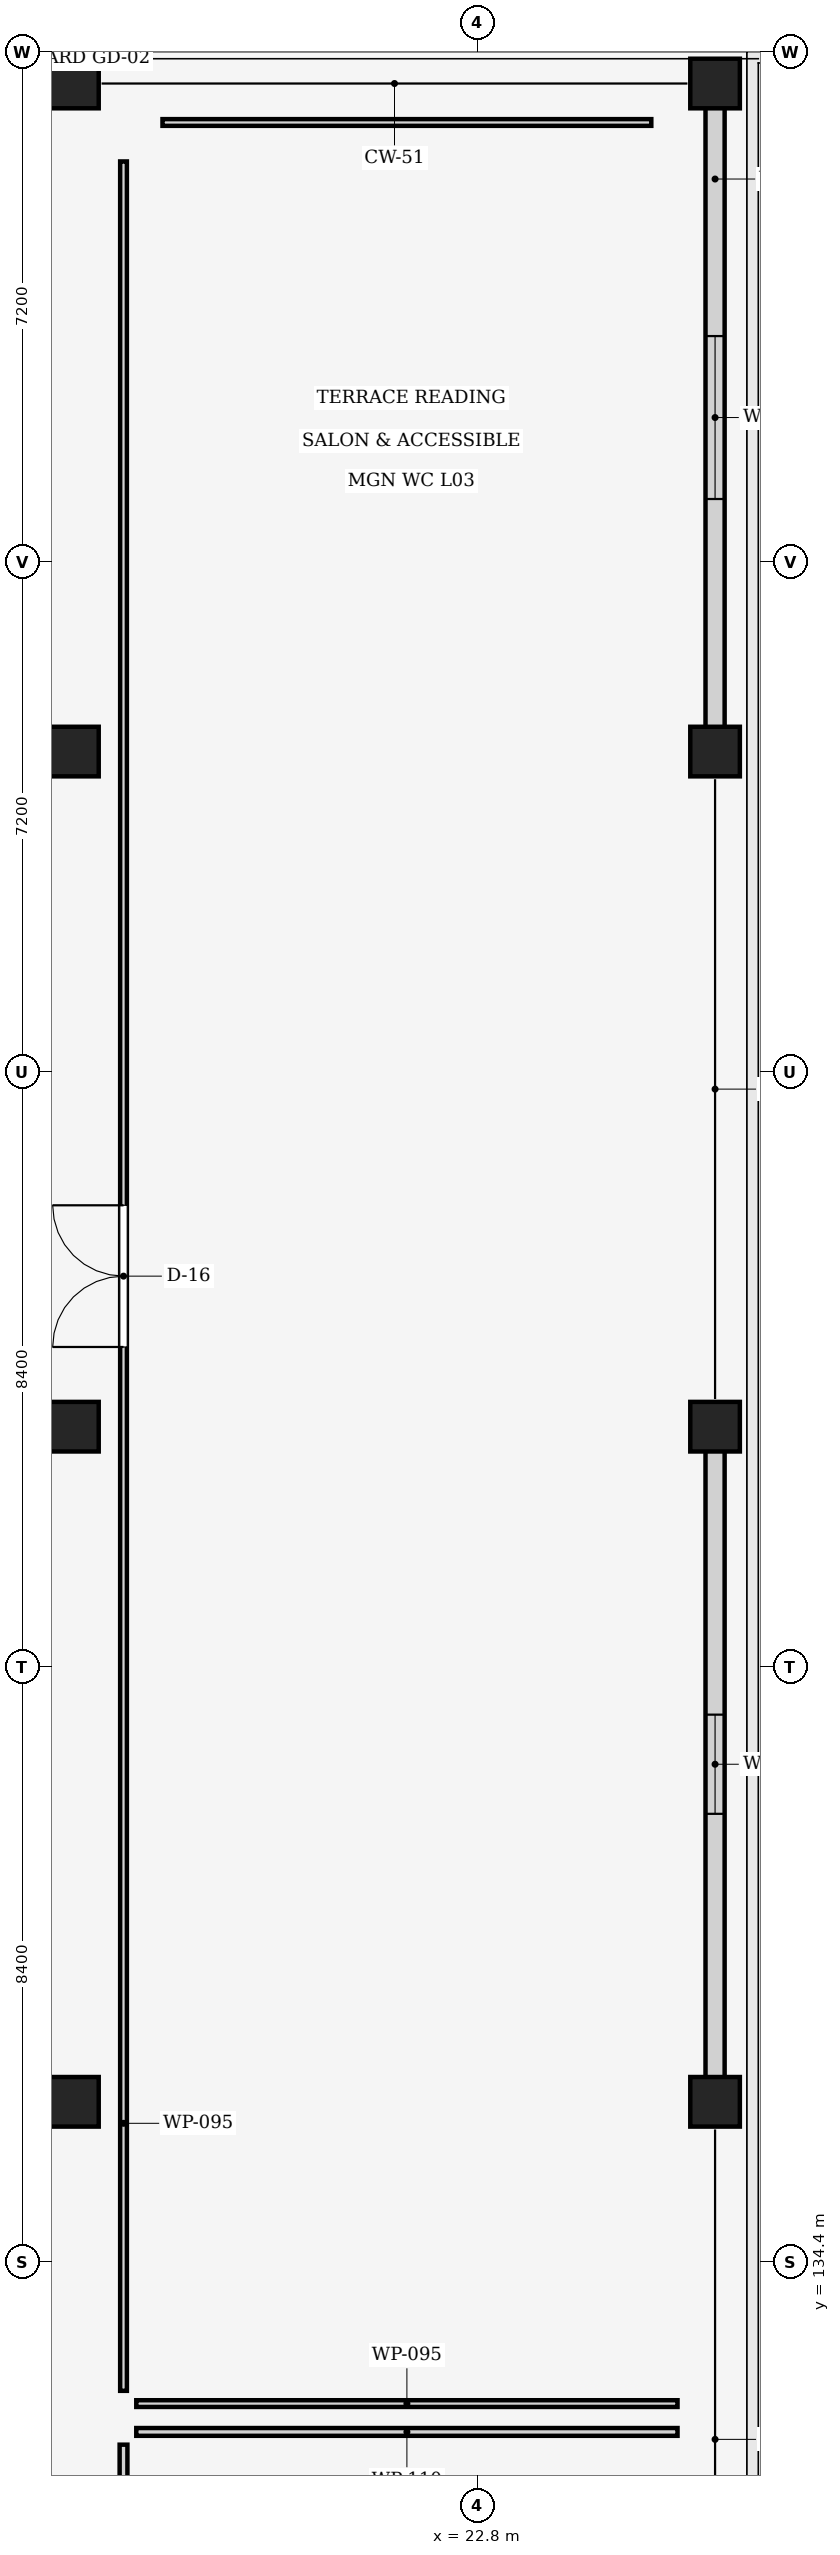
"""IFC4 building model, lengths in metres.
Left out: names, types, materials, properties, quantities, classifications, styles, units other than length and angle.
Written with IfcOpenShell. Run it as: python <this file> out.ifc"""

import sys

from ifc_helpers import new_model, si_unit, direction, frame, frame_2d, origin, origin_2d, place, context, subcontext, project, spatial, rectangle, extrude, element, fill, save


model = new_model("IFC4")
c1 = context("Model", 3, precision=1e-05, world=origin(), true_north=direction((0.0, 1.0)))
c2 = subcontext(c1, "Body", "Model", "MODEL_VIEW")
j1 = project(units=[si_unit("LENGTHUNIT", "METRE"), si_unit("PLANEANGLEUNIT", "RADIAN")], contexts=[c1])
p1 = place(None, origin())
s1 = spatial("IfcSite", under=j1, at=p1, CompositionType="ELEMENT")
p2 = place(p1, origin())
s2 = spatial("IfcBuilding", under=s1, at=p2, CompositionType="ELEMENT")
p3 = place(p2, frame((0.0, 0.0, 13.2)))
s3 = spatial("IfcBuildingStorey", under=s2, at=p3, CompositionType="ELEMENT", Elevation=13.2)
for number, where, z_axis, x_axis in (
    (1, (17.1, 136.66, 0.0), (0.0, 0.0, 1.0), (1.0, 0.0, 0.0)),
    (2, (17.1, 146.19, 0.0), (0.0, 0.0, 1.0), (1.0, 0.0, 0.0)),
    (3, (17.1, 155.72, 0.0), (0.0, 0.0, 1.0), (1.0, 0.0, 0.0)),
    (4, (17.1, 165.15, 0.0), (0.0, 0.0, 1.0), (1.0, 0.0, 0.0)),
    (5, (26.15, 136.66, 0.0), (0.0, 0.0, 1.0), (1.0, 0.0, 0.0)),
    (6, (26.15, 146.19, 0.0), (0.0, 0.0, 1.0), (1.0, 0.0, 0.0)),
    (7, (26.15, 155.72, 0.0), (0.0, 0.0, 1.0), (1.0, 0.0, 0.0)),
    (8, (26.15, 165.15, 0.0), (0.0, 0.0, 1.0), (1.0, 0.0, 0.0)),
):
    element("IfcColumn", number, at=place(p3, frame(where, z_axis=z_axis, x_axis=x_axis)), inside=s3, PredefinedType="COLUMN", context=c2, shape_type="SweptSolid", body=[
        extrude(rectangle(XDim=0.7, YDim=0.7, at=origin_2d()), origin(), (0.0, 0.0, 1.0), 4.05),
    ])
p4 = place(p3, frame((26.15, 164.865, 0.0), z_axis=(0.0, 0.0, 1.0), x_axis=(0.0, -1.0, 0.0)))
e9 = element("IfcWall", 9, at=p4, inside=s3, PredefinedType="STANDARD", context=c2, shape_type="SweptSolid", body=[
    extrude(rectangle(XDim=8.86, YDim=0.27, at=frame_2d((4.43, 0.0))), origin(), (0.0, 0.0, 1.0), 3.165),
])
p5 = place(p4, frame((3.28, 0.0, 0.85)))
e10 = element("IfcOpeningElement", 10, at=p5, cuts=e9, PredefinedType="OPENING", context=c2, shape_type="SweptSolid", body=[
    extrude(rectangle(XDim=2.3, YDim=1.85, at=frame_2d((1.15, 0.925))), frame((0.0, 0.145, 0.0), z_axis=(0.0, -1.0, 0.0), x_axis=(1.0, 0.0, 0.0)), (0.0, 0.0, 1.0), 0.29),
])
p6 = place(p3, frame((26.15, 145.905, 0.0), z_axis=(0.0, 0.0, 1.0), x_axis=(0.0, -1.0, 0.0)))
e11 = element("IfcWall", 11, at=p6, inside=s3, PredefinedType="STANDARD", context=c2, shape_type="SweptSolid", body=[
    extrude(rectangle(XDim=8.96, YDim=0.27, at=frame_2d((4.48, 0.0))), origin(), (0.0, 0.0, 1.0), 3.165),
])
p7 = place(p6, frame((3.78, 0.0, 0.85)))
e12 = element("IfcOpeningElement", 12, at=p7, cuts=e11, PredefinedType="OPENING", context=c2, shape_type="SweptSolid", body=[
    extrude(rectangle(XDim=1.4, YDim=2.05, at=frame_2d((0.7, 1.025))), frame((0.0, 0.145, 0.0), z_axis=(0.0, -1.0, 0.0), x_axis=(1.0, 0.0, 0.0)), (0.0, 0.0, 1.0), 0.29),
])
p8 = place(p3, frame((8.335, 165.15, 0.0), z_axis=(0.0, 0.0, 1.0), x_axis=(1.0, 0.0, 0.0)))
e13 = element("IfcWall", 13, at=p8, inside=s3, PredefinedType="STANDARD", context=c2, shape_type="SweptSolid", body=[
    extrude(rectangle(XDim=8.48, YDim=0.27, at=frame_2d((4.24, 0.0))), origin(), (0.0, 0.0, 1.0), 3.015),
])
p9 = place(p8, frame((2.94, 0.0, 0.85)))
e14 = element("IfcOpeningElement", 14, at=p9, cuts=e13, PredefinedType="OPENING", context=c2, shape_type="SweptSolid", body=[
    extrude(rectangle(XDim=2.6, YDim=1.85, at=frame_2d((1.3, 0.925))), frame((0.0, 0.145, 0.0), z_axis=(0.0, -1.0, 0.0), x_axis=(1.0, 0.0, 0.0)), (0.0, 0.0, 1.0), 0.29),
])
p10 = place(p3, frame((17.8, 102.15, 0.0), z_axis=(0.0, 0.0, 1.0), x_axis=(0.0, 1.0, 0.0)))
e15 = element("IfcWall", 15, at=p10, inside=s3, PredefinedType="PARTITIONING", context=c2, shape_type="SweptSolid", body=[
    extrude(rectangle(XDim=29.67, YDim=0.11, at=frame_2d((14.835, 0.0))), origin(), (0.0, 0.0, 1.0), 3.015),
])
p11 = place(p10, frame((13.085, 0.0, 0.0)))
e16 = element("IfcOpeningElement", 16, at=p11, cuts=e15, PredefinedType="OPENING", context=c2, shape_type="SweptSolid", body=[
    extrude(rectangle(XDim=1.8, YDim=2.22, at=frame_2d((0.9, 1.11))), frame((0.0, 0.065, 0.0), z_axis=(0.0, -1.0, 0.0), x_axis=(1.0, 0.0, 0.0)), (0.0, 0.0, 1.0), 0.13),
])
p12 = place(p3, frame((17.98, 132.0, 0.0), z_axis=(0.0, 0.0, 1.0), x_axis=(1.0, 0.0, 0.0)))
e17 = element("IfcWall", 17, at=p12, inside=s3, PredefinedType="PARTITIONING", context=c2, shape_type="SweptSolid", body=[
    extrude(rectangle(XDim=7.64, YDim=0.11, at=frame_2d((3.82, 0.0))), origin(), (0.0, 0.0, 1.0), 3.7),
])
p13 = place(p3, frame((17.8, 132.58, 0.0), z_axis=(0.0, 0.0, 1.0), x_axis=(0.0, 1.0, 0.0)))
e18 = element("IfcWall", 18, at=p13, inside=s3, PredefinedType="PARTITIONING", context=c2, shape_type="SweptSolid", body=[
    extrude(rectangle(XDim=31.47, YDim=0.095, at=frame_2d((15.735, 0.0))), origin(), (0.0, 0.0, 1.0), 3.015),
])
p14 = place(p13, frame((14.735, 0.0, 0.0)))
e19 = element("IfcOpeningElement", 19, at=p14, cuts=e18, PredefinedType="OPENING", context=c2, shape_type="SweptSolid", body=[
    extrude(rectangle(XDim=2.0, YDim=2.22, at=frame_2d((1.0, 1.11))), frame((0.0, 0.057, 0.0), z_axis=(0.0, -1.0, 0.0), x_axis=(1.0, 0.0, 0.0)), (0.0, 0.0, 1.0), 0.115),
])
p15 = place(p3, frame((25.62, 132.4, 0.0), z_axis=(0.0, 0.0, 1.0), x_axis=(-1.0, 0.0, 0.0)))
e20 = element("IfcWall", 20, at=p15, inside=s3, PredefinedType="PARTITIONING", context=c2, shape_type="SweptSolid", body=[
    extrude(rectangle(XDim=7.64, YDim=0.095, at=frame_2d((3.82, 0.0))), origin(), (0.0, 0.0, 1.0), 3.7),
])
p16 = place(p3, frame((18.35, 164.6, 0.0), z_axis=(0.0, 0.0, 1.0), x_axis=(1.0, 0.0, 0.0)))
e21 = element("IfcWall", 21, at=p16, inside=s3, PredefinedType="PARTITIONING", context=c2, shape_type="SweptSolid", body=[
    extrude(rectangle(XDim=6.9, YDim=0.095, at=frame_2d((3.45, 0.0))), origin(), (0.0, 0.0, 1.0), 3.7),
])
p17 = place(p5, origin())
e22 = element("IfcWindow", 22, at=p17, inside=s3, PartitioningType="SINGLE_PANEL", PredefinedType="WINDOW", context=c2, shape_type="SweptSolid", body=[
    extrude(rectangle(XDim=2.3, YDim=1.85, at=frame_2d((1.15, 0.925))), frame((0.0, 0.03, 0.0), z_axis=(0.0, -1.0, 0.0), x_axis=(1.0, 0.0, 0.0)), (0.0, 0.0, 1.0), 0.06),
])
fill(e10, e22)
p18 = place(p7, origin())
e23 = element("IfcWindow", 23, at=p18, inside=s3, PartitioningType="SINGLE_PANEL", PredefinedType="WINDOW", context=c2, shape_type="SweptSolid", body=[
    extrude(rectangle(XDim=1.4, YDim=2.05, at=frame_2d((0.7, 1.025))), frame((0.0, 0.03, 0.0), z_axis=(0.0, -1.0, 0.0), x_axis=(1.0, 0.0, 0.0)), (0.0, 0.0, 1.0), 0.06),
])
fill(e12, e23)
p19 = place(p14, origin())
e24 = element("IfcDoor", 24, at=p19, inside=s3, OperationType="DOUBLE_DOOR_SINGLE_SWING", PredefinedType="DOOR", context=c2, shape_type="SweptSolid", body=[
    extrude(rectangle(XDim=2.0, YDim=2.22, at=frame_2d((1.0, 1.11))), frame((0.0, 0.025, 0.0), z_axis=(0.0, -1.0, 0.0), x_axis=(1.0, 0.0, 0.0)), (0.0, 0.0, 1.0), 0.05),
])
fill(e19, e24)
save(model, sys.argv[1])
